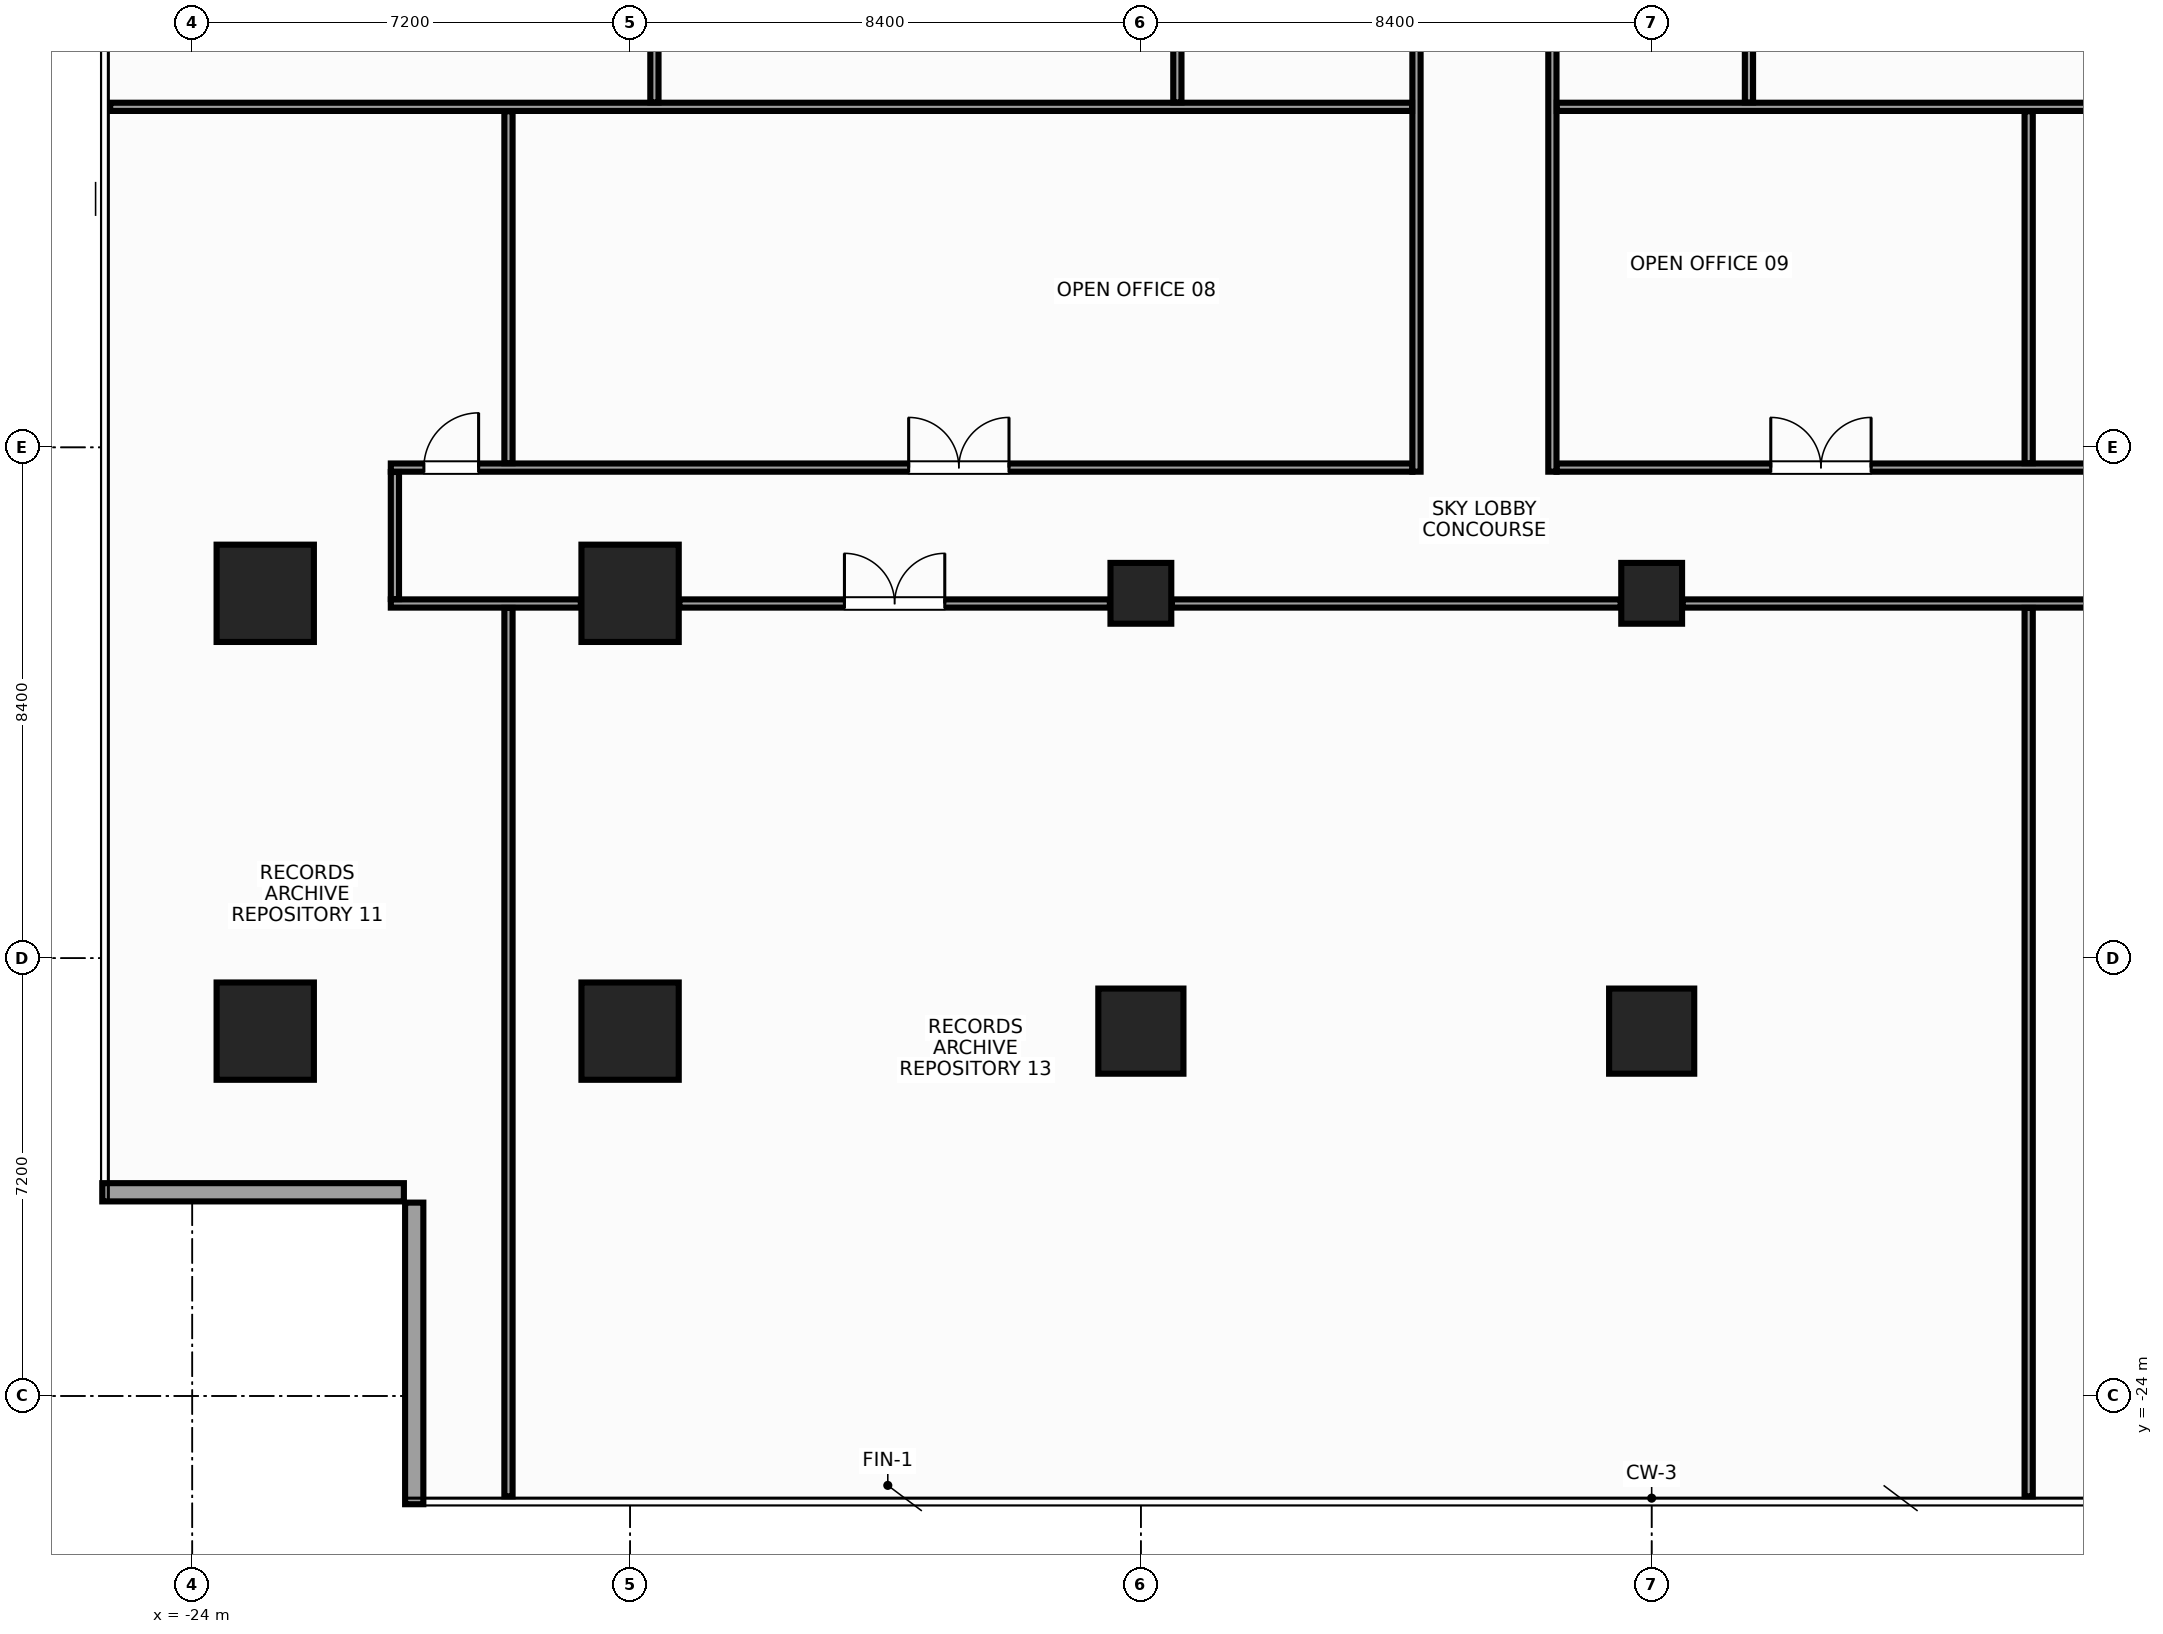
"""IFC4 building model, lengths in metres.
Left out: names, types, materials, properties, quantities, classifications, styles, units other than length and angle.
Written with IfcOpenShell. Run it as: python <this file> out.ifc"""

import sys

from ifc_helpers import new_model, si_unit, direction, frame, frame_2d, origin, origin_2d, place, context, subcontext, project, spatial, rectangle, hollow_rectangle, extrude, source, transform, mapped, element, fill, save


model = new_model("IFC4")
c1 = context("Model", 3, precision=1e-05, world=origin(), true_north=direction((0.0, 1.0)))
c2 = subcontext(c1, "Body", "Model", "MODEL_VIEW")
j1 = project(units=[si_unit("LENGTHUNIT", "METRE"), si_unit("PLANEANGLEUNIT", "RADIAN")], contexts=[c1])
p1 = place(None, origin())
s1 = spatial("IfcSite", under=j1, at=p1, CompositionType="ELEMENT")
p2 = place(p1, origin())
s2 = spatial("IfcBuilding", under=s1, at=p2, CompositionType="ELEMENT")
p3 = place(p2, frame((0.0, 0.0, 77.6)))
s3 = spatial("IfcBuildingStorey", under=s2, at=p3, CompositionType="ELEMENT", Elevation=77.6)
m1 = source(origin(), c2, "Body", "SweptSolid", [
    extrude(rectangle(XDim=1.6, YDim=1.6, at=origin_2d()), origin(), (0.0, 0.0, 1.0), 3.6),
])
for number, where, z_axis, x_axis in (
    (1, (-16.8, -18.0, 0.0), (0.0, 0.0, 1.0), (1.0, 0.0, 0.0)),
    (2, (-16.8, -10.8, 0.0), (0.0, 0.0, 1.0), (1.0, 0.0, 0.0)),
    (3, (-22.8, -18.0, 0.0), (0.0, 0.0, 1.0), (1.0, 0.0, 0.0)),
    (4, (-22.8, -10.8, 0.0), (0.0, 0.0, 1.0), (1.0, 0.0, 0.0)),
):
    element("IfcColumn", number, at=place(p3, frame(where, z_axis=z_axis, x_axis=x_axis)), inside=s3, PredefinedType="COLUMN", context=c2, shape_type="MappedRepresentation", body=[
        mapped(m1, transform((0.0, 0.0, 0.0), x_axis=(1.0, 0.0, 0.0), y_axis=(0.0, 1.0, 0.0), z_axis=(0.0, 0.0, 1.0), scale=1.0)),
    ])
m2 = source(origin(), c2, "Body", "SweptSolid", [
    extrude(rectangle(XDim=1.4, YDim=1.4, at=origin_2d()), origin(), (0.0, 0.0, 1.0), 3.6),
])
p4 = place(p3, frame((-8.4, -18.0, 0.0), z_axis=(0.0, 0.0, 1.0), x_axis=(1.0, 0.0, 0.0)))
e5 = element("IfcColumn", 5, at=p4, inside=s3, PredefinedType="COLUMN", context=c2, shape_type="MappedRepresentation", body=[
    mapped(m2, transform((0.0, 0.0, 0.0), x_axis=(1.0, 0.0, 0.0), y_axis=(0.0, 1.0, 0.0), z_axis=(0.0, 0.0, 1.0), scale=1.0)),
])
m3 = source(origin(), c2, "Body", "SweptSolid", [
    extrude(hollow_rectangle(XDim=1.0, YDim=1.0, WallThickness=0.045, at=origin_2d()), origin(), (0.0, 0.0, 1.0), 3.6),
])
p5 = place(p3, frame((-8.4, -10.8, 0.0), z_axis=(0.0, 0.0, 1.0), x_axis=(1.0, 0.0, 0.0)))
e6 = element("IfcColumn", 6, at=p5, inside=s3, PredefinedType="COLUMN", context=c2, shape_type="MappedRepresentation", body=[
    mapped(m3, transform((0.0, 0.0, 0.0), x_axis=(1.0, 0.0, 0.0), y_axis=(0.0, 1.0, 0.0), z_axis=(0.0, 0.0, 1.0), scale=1.0)),
])
p6 = place(p3, frame((0.0, -18.0, 0.0), z_axis=(0.0, 0.0, 1.0), x_axis=(1.0, 0.0, 0.0)))
e7 = element("IfcColumn", 7, at=p6, inside=s3, PredefinedType="COLUMN", context=c2, shape_type="MappedRepresentation", body=[
    mapped(m2, transform((0.0, 0.0, 0.0), x_axis=(1.0, 0.0, 0.0), y_axis=(0.0, 1.0, 0.0), z_axis=(0.0, 0.0, 1.0), scale=1.0)),
])
m4 = source(origin(), c2, "Body", "SweptSolid", [
    extrude(rectangle(XDim=1.0, YDim=1.0, at=origin_2d()), origin(), (0.0, 0.0, 1.0), 3.6),
])
p7 = place(p3, frame((0.0, -10.8, 0.0), z_axis=(0.0, 0.0, 1.0), x_axis=(1.0, 0.0, 0.0)))
e8 = element("IfcColumn", 8, at=p7, inside=s3, PredefinedType="COLUMN", context=c2, shape_type="MappedRepresentation", body=[
    mapped(m4, transform((0.0, 0.0, 0.0), x_axis=(1.0, 0.0, 0.0), y_axis=(0.0, 1.0, 0.0), z_axis=(0.0, 0.0, 1.0), scale=1.0)),
])
m5 = source(origin(), c2, "Body", "SweptSolid", [
    extrude(rectangle(XDim=4.96, YDim=0.3, at=frame_2d((2.48, 0.0))), origin(), (0.0, 0.0, 1.0), 2.74),
])
for number, where, z_axis, x_axis in (
    (9, (-25.48, -20.65, 0.0), (0.0, 0.0, 1.0), (1.0, 0.0, 0.0)),
    (10, (-20.35, -20.82, 0.0), (0.0, 0.0, 1.0), (0.0, -1.0, 0.0)),
):
    element("IfcWall", number, at=place(p3, frame(where, z_axis=z_axis, x_axis=x_axis)), inside=s3, PredefinedType="STANDARD", context=c2, shape_type="MappedRepresentation", body=[
        mapped(m5, transform((0.0, 0.0, 0.0), x_axis=(1.0, 0.0, 0.0), y_axis=(0.0, 1.0, 0.0), z_axis=(0.0, 0.0, 1.0), scale=1.0)),
    ])
m6 = source(origin(), c2, "Body", "SweptSolid", [
    extrude(rectangle(XDim=16.8, YDim=0.135, at=frame_2d((8.4, 0.0))), origin(), (0.0, 0.0, 1.0), 2.745),
])
p8 = place(p3, frame((-20.735, -8.732, 0.0), z_axis=(0.0, 0.0, 1.0), x_axis=(1.0, 0.0, 0.0)))
e11 = element("IfcWall", 11, at=p8, inside=s3, PredefinedType="PARTITIONING", context=c2, shape_type="MappedRepresentation", body=[
    mapped(m6, transform((0.0, 0.0, 0.0), x_axis=(1.0, 0.0, 0.0), y_axis=(0.0, 1.0, 0.0), z_axis=(0.0, 0.0, 1.0), scale=1.0)),
])
p9 = place(p8, frame((8.516, 0.0, 0.0)))
e12 = element("IfcOpeningElement", 12, at=p9, cuts=e11, PredefinedType="OPENING", context=c2, shape_type="SweptSolid", body=[
    extrude(rectangle(XDim=1.65, YDim=2.35, at=frame_2d((0.825, 1.175))), frame((0.0, 0.08, 0.0), z_axis=(0.0, -1.0, 0.0), x_axis=(1.0, 0.0, 0.0)), (0.0, 0.0, 1.0), 0.159),
])
p10 = place(p8, frame((0.544, 0.0, 0.0)))
e13 = element("IfcOpeningElement", 13, at=p10, cuts=e11, PredefinedType="OPENING", context=c2, shape_type="SweptSolid", body=[
    extrude(rectangle(XDim=0.9, YDim=2.15, at=frame_2d((0.45, 1.075))), frame((0.0, 0.08, 0.0), z_axis=(0.0, -1.0, 0.0), x_axis=(1.0, 0.0, 0.0)), (0.0, 0.0, 1.0), 0.159),
])
m7 = source(origin(), c2, "Body", "SweptSolid", [
    extrude(rectangle(XDim=22.3, YDim=0.135, at=frame_2d((11.15, 0.0))), origin(), (0.0, 0.0, 1.0), 2.745),
])
p11 = place(p3, frame((-1.565, -8.732, 0.0), z_axis=(0.0, 0.0, 1.0), x_axis=(1.0, 0.0, 0.0)))
e14 = element("IfcWall", 14, at=p11, inside=s3, PredefinedType="PARTITIONING", context=c2, shape_type="MappedRepresentation", body=[
    mapped(m7, transform((0.0, 0.0, 0.0), x_axis=(1.0, 0.0, 0.0), y_axis=(0.0, 1.0, 0.0), z_axis=(0.0, 0.0, 1.0), scale=1.0)),
])
p12 = place(p11, frame((3.524, 0.0, 0.0)))
e15 = element("IfcOpeningElement", 15, at=p12, cuts=e14, PredefinedType="OPENING", context=c2, shape_type="SweptSolid", body=[
    extrude(rectangle(XDim=1.65, YDim=2.35, at=frame_2d((0.825, 1.175))), frame((0.0, 0.08, 0.0), z_axis=(0.0, -1.0, 0.0), x_axis=(1.0, 0.0, 0.0)), (0.0, 0.0, 1.0), 0.159),
])
p13 = place(p11, frame((13.24, 0.0, 0.0)))
e16 = element("IfcOpeningElement", 16, at=p13, cuts=e14, PredefinedType="OPENING", context=c2, shape_type="SweptSolid", body=[
    extrude(rectangle(XDim=1.65, YDim=2.35, at=frame_2d((0.825, 1.175))), frame((0.0, 0.08, 0.0), z_axis=(0.0, -1.0, 0.0), x_axis=(1.0, 0.0, 0.0)), (0.0, 0.0, 1.0), 0.159),
])
p14 = place(p11, frame((20.856, 0.0, 0.0)))
e17 = element("IfcOpeningElement", 17, at=p14, cuts=e14, PredefinedType="OPENING", context=c2, shape_type="SweptSolid", body=[
    extrude(rectangle(XDim=0.9, YDim=2.15, at=frame_2d((0.45, 1.075))), frame((0.0, 0.08, 0.0), z_axis=(0.0, -1.0, 0.0), x_axis=(1.0, 0.0, 0.0)), (0.0, 0.0, 1.0), 0.159),
])
m8 = source(origin(), c2, "Body", "SweptSolid", [
    extrude(rectangle(XDim=3.125, YDim=0.135, at=frame_2d((1.562, 0.0))), origin(), (0.0, 0.0, 1.0), 2.745),
])
p15 = place(p3, frame((-20.735, -10.968, 0.0), z_axis=(0.0, 0.0, 1.0), x_axis=(1.0, 0.0, 0.0)))
e18 = element("IfcWall", 18, at=p15, inside=s3, PredefinedType="PARTITIONING", context=c2, shape_type="MappedRepresentation", body=[
    mapped(m8, transform((0.0, 0.0, 0.0), x_axis=(1.0, 0.0, 0.0), y_axis=(0.0, 1.0, 0.0), z_axis=(0.0, 0.0, 1.0), scale=1.0)),
])
m9 = source(origin(), c2, "Body", "SweptSolid", [
    extrude(rectangle(XDim=7.08, YDim=0.135, at=frame_2d((3.54, 0.0))), origin(), (0.0, 0.0, 1.0), 2.745),
])
p16 = place(p3, frame((-15.99, -10.968, 0.0), z_axis=(0.0, 0.0, 1.0), x_axis=(1.0, 0.0, 0.0)))
e19 = element("IfcWall", 19, at=p16, inside=s3, PredefinedType="PARTITIONING", context=c2, shape_type="MappedRepresentation", body=[
    mapped(m9, transform((0.0, 0.0, 0.0), x_axis=(1.0, 0.0, 0.0), y_axis=(0.0, 1.0, 0.0), z_axis=(0.0, 0.0, 1.0), scale=1.0)),
])
p17 = place(p16, frame((2.715, 0.0, 0.0)))
e20 = element("IfcOpeningElement", 20, at=p17, cuts=e19, PredefinedType="OPENING", context=c2, shape_type="SweptSolid", body=[
    extrude(rectangle(XDim=1.65, YDim=2.35, at=frame_2d((0.825, 1.175))), frame((0.0, 0.08, 0.0), z_axis=(0.0, -1.0, 0.0), x_axis=(1.0, 0.0, 0.0)), (0.0, 0.0, 1.0), 0.159),
])
m10 = source(origin(), c2, "Body", "SweptSolid", [
    extrude(rectangle(XDim=7.38, YDim=0.135, at=frame_2d((3.69, 0.0))), origin(), (0.0, 0.0, 1.0), 2.745),
])
for number, where, z_axis, x_axis in (
    (21, (-7.89, -10.968, 0.0), (0.0, 0.0, 1.0), (1.0, 0.0, 0.0)),
    (22, (0.51, -10.968, 0.0), (0.0, 0.0, 1.0), (1.0, 0.0, 0.0)),
):
    element("IfcWall", number, at=place(p3, frame(where, z_axis=z_axis, x_axis=x_axis)), inside=s3, PredefinedType="PARTITIONING", context=c2, shape_type="MappedRepresentation", body=[
        mapped(m10, transform((0.0, 0.0, 0.0), x_axis=(1.0, 0.0, 0.0), y_axis=(0.0, 1.0, 0.0), z_axis=(0.0, 0.0, 1.0), scale=1.0)),
    ])
m11 = source(origin(), c2, "Body", "SweptSolid", [
    extrude(rectangle(XDim=16.6, YDim=0.135, at=frame_2d((8.3, 0.0))), origin(), (0.0, 0.0, 1.0), 2.645),
])
for number, where, z_axis, x_axis in (
    (23, (-3.867, -8.8, 0.0), (0.0, 0.0, 1.0), (0.0, 1.0, 0.0)),
    (24, (-1.633, -8.8, 0.0), (0.0, 0.0, 1.0), (0.0, 1.0, 0.0)),
):
    element("IfcWall", number, at=place(p3, frame(where, z_axis=z_axis, x_axis=x_axis)), inside=s3, PredefinedType="PARTITIONING", context=c2, shape_type="MappedRepresentation", body=[
        mapped(m11, transform((0.0, 0.0, 0.0), x_axis=(1.0, 0.0, 0.0), y_axis=(0.0, 1.0, 0.0), z_axis=(0.0, 0.0, 1.0), scale=1.0)),
    ])
m12 = source(origin(), c2, "Body", "SweptSolid", [
    extrude(rectangle(XDim=2.09, YDim=0.135, at=frame_2d((1.045, 0.0))), origin(), (0.0, 0.0, 1.0), 3.36),
])
p18 = place(p3, frame((-20.667, -10.895, 0.0), z_axis=(0.0, 0.0, 1.0), x_axis=(0.0, 1.0, 0.0)))
e25 = element("IfcWall", 25, at=p18, inside=s3, PredefinedType="PARTITIONING", context=c2, shape_type="MappedRepresentation", body=[
    mapped(m12, transform((0.0, 0.0, 0.0), x_axis=(1.0, 0.0, 0.0), y_axis=(0.0, 1.0, 0.0), z_axis=(0.0, 0.0, 1.0), scale=1.0)),
])
m13 = source(origin(), c2, "Body", "SweptSolid", [
    extrude(rectangle(XDim=21.41, YDim=0.135, at=frame_2d((10.705, 0.0))), origin(), (0.0, 0.0, 1.0), 2.745),
])
p19 = place(p3, frame((-25.35, -2.8, 0.0), z_axis=(0.0, 0.0, 1.0), x_axis=(1.0, 0.0, 0.0)))
e26 = element("IfcWall", 26, at=p19, inside=s3, PredefinedType="PARTITIONING", context=c2, shape_type="MappedRepresentation", body=[
    mapped(m13, transform((0.0, 0.0, 0.0), x_axis=(1.0, 0.0, 0.0), y_axis=(0.0, 1.0, 0.0), z_axis=(0.0, 0.0, 1.0), scale=1.0)),
])
m14 = source(origin(), c2, "Body", "SweptSolid", [
    extrude(rectangle(XDim=26.91, YDim=0.135, at=frame_2d((13.455, 0.0))), origin(), (0.0, 0.0, 1.0), 2.745),
])
p20 = place(p3, frame((-1.56, -2.8, 0.0), z_axis=(0.0, 0.0, 1.0), x_axis=(1.0, 0.0, 0.0)))
e27 = element("IfcWall", 27, at=p20, inside=s3, PredefinedType="PARTITIONING", context=c2, shape_type="MappedRepresentation", body=[
    mapped(m14, transform((0.0, 0.0, 0.0), x_axis=(1.0, 0.0, 0.0), y_axis=(0.0, 1.0, 0.0), z_axis=(0.0, 0.0, 1.0), scale=1.0)),
])
m15 = source(origin(), c2, "Body", "SweptSolid", [
    extrude(rectangle(XDim=1.917, YDim=0.135, at=frame_2d((0.959, 0.0))), origin(), (0.0, 0.0, 1.0), 3.36),
])
p21 = place(p3, frame((-16.4, -2.728, 0.0), z_axis=(0.0, 0.0, 1.0), x_axis=(0.0, 1.0, 0.0)))
e28 = element("IfcWall", 28, at=p21, inside=s3, PredefinedType="PARTITIONING", context=c2, shape_type="MappedRepresentation", body=[
    mapped(m15, transform((0.0, 0.0, 0.0), x_axis=(1.0, 0.0, 0.0), y_axis=(0.0, 1.0, 0.0), z_axis=(0.0, 0.0, 1.0), scale=1.0)),
])
m16 = source(origin(), c2, "Body", "SweptSolid", [
    extrude(rectangle(XDim=10.387, YDim=0.135, at=frame_2d((5.194, 0.0))), origin(), (0.0, 0.0, 1.0), 2.645),
])
for number, where, z_axis, x_axis in (
    (29, (-7.8, -2.728, 0.0), (0.0, 0.0, 1.0), (0.0, 1.0, 0.0)),
    (30, (1.6, -2.728, 0.0), (0.0, 0.0, 1.0), (0.0, 1.0, 0.0)),
):
    element("IfcWall", number, at=place(p3, frame(where, z_axis=z_axis, x_axis=x_axis)), inside=s3, PredefinedType="PARTITIONING", context=c2, shape_type="MappedRepresentation", body=[
        mapped(m16, transform((0.0, 0.0, 0.0), x_axis=(1.0, 0.0, 0.0), y_axis=(0.0, 1.0, 0.0), z_axis=(0.0, 0.0, 1.0), scale=1.0)),
    ])
m17 = source(origin(), c2, "Body", "SweptSolid", [
    extrude(rectangle(XDim=14.61, YDim=0.135, at=frame_2d((7.305, 0.0))), origin(), (0.0, 0.0, 1.0), 2.745),
])
p22 = place(p3, frame((-18.8, -25.65, 0.0), z_axis=(0.0, 0.0, 1.0), x_axis=(0.0, 1.0, 0.0)))
e31 = element("IfcWall", 31, at=p22, inside=s3, PredefinedType="PARTITIONING", context=c2, shape_type="MappedRepresentation", body=[
    mapped(m17, transform((0.0, 0.0, 0.0), x_axis=(1.0, 0.0, 0.0), y_axis=(0.0, 1.0, 0.0), z_axis=(0.0, 0.0, 1.0), scale=1.0)),
])
m18 = source(origin(), c2, "Body", "SweptSolid", [
    extrude(rectangle(XDim=5.787, YDim=0.135, at=frame_2d((2.894, 0.0))), origin(), (0.0, 0.0, 1.0), 3.36),
])
p23 = place(p3, frame((-18.8, -8.66, 0.0), z_axis=(0.0, 0.0, 1.0), x_axis=(0.0, 1.0, 0.0)))
e32 = element("IfcWall", 32, at=p23, inside=s3, PredefinedType="PARTITIONING", context=c2, shape_type="MappedRepresentation", body=[
    mapped(m18, transform((0.0, 0.0, 0.0), x_axis=(1.0, 0.0, 0.0), y_axis=(0.0, 1.0, 0.0), z_axis=(0.0, 0.0, 1.0), scale=1.0)),
])
p24 = place(p3, frame((6.2, -25.65, 0.0), z_axis=(0.0, 0.0, 1.0), x_axis=(0.0, 1.0, 0.0)))
e33 = element("IfcWall", 33, at=p24, inside=s3, PredefinedType="PARTITIONING", context=c2, shape_type="MappedRepresentation", body=[
    mapped(m17, transform((0.0, 0.0, 0.0), x_axis=(1.0, 0.0, 0.0), y_axis=(0.0, 1.0, 0.0), z_axis=(0.0, 0.0, 1.0), scale=1.0)),
])
p25 = place(p3, frame((6.2, -8.66, 0.0), z_axis=(0.0, 0.0, 1.0), x_axis=(0.0, 1.0, 0.0)))
e34 = element("IfcWall", 34, at=p25, inside=s3, PredefinedType="PARTITIONING", context=c2, shape_type="MappedRepresentation", body=[
    mapped(m18, transform((0.0, 0.0, 0.0), x_axis=(1.0, 0.0, 0.0), y_axis=(0.0, 1.0, 0.0), z_axis=(0.0, 0.0, 1.0), scale=1.0)),
])
m19 = source(origin(), c2, "Body", "SweptSolid", [
    extrude(rectangle(XDim=1.65, YDim=2.35, at=frame_2d((0.825, 1.175))), frame((0.0, 0.025, 0.0), z_axis=(0.0, -1.0, 0.0), x_axis=(1.0, 0.0, 0.0)), (0.0, 0.0, 1.0), 0.05),
])
p26 = place(p9, origin())
e35 = element("IfcDoor", 35, at=p26, inside=s3, OperationType="DOUBLE_DOOR_SINGLE_SWING", PredefinedType="DOOR", context=c2, shape_type="MappedRepresentation", body=[
    mapped(m19, transform((0.0, 0.0, 0.0), x_axis=(1.0, 0.0, 0.0), y_axis=(0.0, 1.0, 0.0), z_axis=(0.0, 0.0, 1.0), scale=1.0)),
])
fill(e12, e35)
p27 = place(p12, origin())
e36 = element("IfcDoor", 36, at=p27, inside=s3, OperationType="DOUBLE_DOOR_SINGLE_SWING", PredefinedType="DOOR", context=c2, shape_type="MappedRepresentation", body=[
    mapped(m19, transform((0.0, 0.0, 0.0), x_axis=(1.0, 0.0, 0.0), y_axis=(0.0, 1.0, 0.0), z_axis=(0.0, 0.0, 1.0), scale=1.0)),
])
fill(e15, e36)
m20 = source(origin(), c2, "Body", "SweptSolid", [
    extrude(rectangle(XDim=0.9, YDim=2.15, at=frame_2d((0.45, 1.075))), frame((0.0, 0.025, 0.0), z_axis=(0.0, -1.0, 0.0), x_axis=(1.0, 0.0, 0.0)), (0.0, 0.0, 1.0), 0.05),
])
p28 = place(p10, origin())
e37 = element("IfcDoor", 37, at=p28, inside=s3, OperationType="SINGLE_SWING_RIGHT", PredefinedType="DOOR", context=c2, shape_type="MappedRepresentation", body=[
    mapped(m20, transform((0.0, 0.0, 0.0), x_axis=(1.0, 0.0, 0.0), y_axis=(0.0, 1.0, 0.0), z_axis=(0.0, 0.0, 1.0), scale=1.0)),
])
fill(e13, e37)
p29 = place(p17, origin())
e38 = element("IfcDoor", 38, at=p29, inside=s3, OperationType="DOUBLE_DOOR_SINGLE_SWING", PredefinedType="DOOR", context=c2, shape_type="MappedRepresentation", body=[
    mapped(m19, transform((0.0, 0.0, 0.0), x_axis=(1.0, 0.0, 0.0), y_axis=(0.0, 1.0, 0.0), z_axis=(0.0, 0.0, 1.0), scale=1.0)),
])
fill(e20, e38)
save(model, sys.argv[1])
